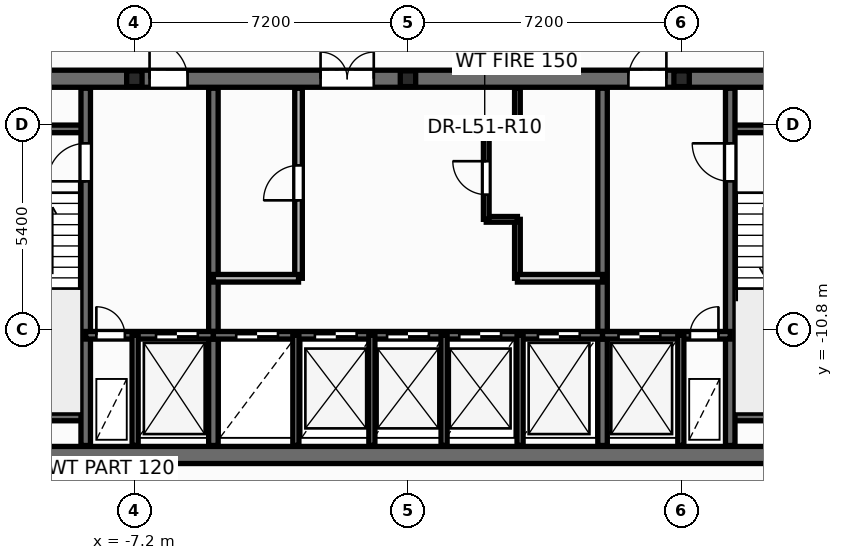
"""IFC4 building model, lengths in metres.
Left out: names, types, materials, properties, quantities, classifications, styles, units other than length and angle.
Written with IfcOpenShell. Run it as: python <this file> out.ifc"""

import sys

from ifc_helpers import new_model, si_unit, direction, frame, frame_2d, origin, origin_2d, place, context, subcontext, project, spatial, rectangle, i_section, extrude, element, fill, save


model = new_model("IFC4")
c1 = context("Model", 3, precision=1e-05, world=origin(), true_north=direction((0.0, 1.0)))
c2 = subcontext(c1, "Body", "Model", "MODEL_VIEW")
j1 = project(units=[si_unit("LENGTHUNIT", "METRE"), si_unit("PLANEANGLEUNIT", "RADIAN")], contexts=[c1])
p1 = place(None, origin())
s1 = spatial("IfcSite", under=j1, at=p1, CompositionType="ELEMENT")
p2 = place(p1, origin())
s2 = spatial("IfcBuilding", under=s1, at=p2, CompositionType="ELEMENT")
p3 = place(p2, frame((0.0, 0.0, 196.5)))
s3 = spatial("IfcBuildingStorey", under=s2, at=p3, CompositionType="ELEMENT", Elevation=196.5)
for number, where, z_axis, x_axis in (
    (1, (-7.2, -4.2, 0.0), (0.0, 0.0, 1.0), (1.0, 0.0, 0.0)),
    (2, (0.0, -4.2, 0.0), (0.0, 0.0, 1.0), (1.0, 0.0, 0.0)),
    (3, (7.2, -4.2, 0.0), (0.0, 0.0, 1.0), (1.0, 0.0, 0.0)),
):
    element("IfcColumn", number, at=place(p3, frame(where, z_axis=z_axis, x_axis=x_axis)), inside=s3, PredefinedType="PILASTER", context=c2, shape_type="SweptSolid", body=[
        extrude(i_section(OverallWidth=0.405, OverallDepth=0.414, WebThickness=0.022, FlangeThickness=0.032, at=origin_2d()), origin(), (0.0, 0.0, 1.0), 3.6),
    ])
p4 = place(p3, frame((2.88, -9.45, 0.0), z_axis=(0.0, 0.0, 1.0), x_axis=(0.0, 1.0, 0.0)))
e4 = element("IfcWall", 4, at=p4, inside=s3, PredefinedType="PARTITIONING", context=c2, shape_type="SweptSolid", body=[
    extrude(rectangle(XDim=1.55, YDim=0.15, at=frame_2d((0.775, 0.0))), origin(), (0.0, 0.0, 1.0), 3.35),
])
p5 = place(p3, frame((2.06, -7.9, 0.0), z_axis=(0.0, 0.0, 1.0), x_axis=(1.0, 0.0, 0.0)))
e5 = element("IfcWall", 5, at=p5, inside=s3, PredefinedType="PARTITIONING", context=c2, shape_type="SweptSolid", body=[
    extrude(rectangle(XDim=0.82, YDim=0.15, at=frame_2d((0.41, 0.0))), origin(), (0.0, 0.0, 1.0), 3.35),
])
p6 = place(p3, frame((2.06, -7.9, 0.0), z_axis=(0.0, 0.0, 1.0), x_axis=(0.0, 1.0, 0.0)))
e6 = element("IfcWall", 6, at=p6, inside=s3, PredefinedType="PARTITIONING", context=c2, shape_type="SweptSolid", body=[
    extrude(rectangle(XDim=2.3, YDim=0.15, at=frame_2d((1.15, 0.0))), origin(), (0.0, 0.0, 1.0), 3.35),
])
p7 = place(p6, frame((0.65, 0.0, 0.0)))
e7 = element("IfcOpeningElement", 7, at=p7, cuts=e6, PredefinedType="OPENING", context=c2, shape_type="SweptSolid", body=[
    extrude(rectangle(XDim=0.886, YDim=2.104, at=frame_2d((0.44, 1.052))), frame((0.0, 0.085, 0.0), z_axis=(0.0, -1.0, 0.0), x_axis=(1.0, 0.0, 0.0)), (0.0, 0.0, 1.0), 0.17),
])
p8 = place(p3, frame((2.06, -5.6, 0.0), z_axis=(0.0, 0.0, 1.0), x_axis=(1.0, 0.0, 0.0)))
e8 = element("IfcWall", 8, at=p8, inside=s3, PredefinedType="PARTITIONING", context=c2, shape_type="SweptSolid", body=[
    extrude(rectangle(XDim=0.82, YDim=0.15, at=frame_2d((0.41, 0.0))), origin(), (0.0, 0.0, 1.0), 3.35),
])
p9 = place(p3, frame((2.88, -5.6, 0.0), z_axis=(0.0, 0.0, 1.0), x_axis=(0.0, 1.0, 0.0)))
e9 = element("IfcWall", 9, at=p9, inside=s3, PredefinedType="PARTITIONING", context=c2, shape_type="SweptSolid", body=[
    extrude(rectangle(XDim=1.15, YDim=0.15, at=frame_2d((0.575, 0.0))), origin(), (0.0, 0.0, 1.0), 3.35),
])
p10 = place(p3, frame((-12.65, -14.1, 0.0), z_axis=(0.0, 0.0, 1.0), x_axis=(1.0, 0.0, 0.0)))
e10 = element("IfcWall", 10, at=p10, inside=s3, PredefinedType="SHEAR", context=c2, shape_type="SweptSolid", body=[
    extrude(rectangle(XDim=25.3, YDim=0.45, at=frame_2d((12.65, 0.0))), origin(), (0.0, 0.0, 1.0), 3.6),
])
p11 = place(p3, frame((-12.65, -4.2, 0.0), z_axis=(0.0, 0.0, 1.0), x_axis=(1.0, 0.0, 0.0)))
e11 = element("IfcWall", 11, at=p11, inside=s3, PredefinedType="SHEAR", context=c2, shape_type="SweptSolid", body=[
    extrude(rectangle(XDim=25.3, YDim=0.45, at=frame_2d((12.65, 0.0))), origin(), (0.0, 0.0, 1.0), 3.6),
])
p12 = place(p11, frame((1.85, 0.0, 0.0)))
e12 = element("IfcOpeningElement", 12, at=p12, cuts=e11, PredefinedType="OPENING", context=c2, shape_type="SweptSolid", body=[
    extrude(rectangle(XDim=0.756, YDim=2.054, at=frame_2d((0.375, 1.027))), frame((0.0, 0.235, 0.0), z_axis=(0.0, -1.0, 0.0), x_axis=(1.0, 0.0, 0.0)), (0.0, 0.0, 1.0), 0.47),
])
p13 = place(p11, frame((22.65, 0.0, 0.0)))
e13 = element("IfcOpeningElement", 13, at=p13, cuts=e11, PredefinedType="OPENING", context=c2, shape_type="SweptSolid", body=[
    extrude(rectangle(XDim=0.756, YDim=2.054, at=frame_2d((0.375, 1.027))), frame((0.0, 0.235, 0.0), z_axis=(0.0, -1.0, 0.0), x_axis=(1.0, 0.0, 0.0)), (0.0, 0.0, 1.0), 0.47),
])
p14 = place(p11, frame((5.85, 0.0, 0.0)))
e14 = element("IfcOpeningElement", 14, at=p14, cuts=e11, PredefinedType="OPENING", context=c2, shape_type="SweptSolid", body=[
    extrude(rectangle(XDim=1.006, YDim=2.104, at=frame_2d((0.5, 1.052))), frame((0.0, 0.235, 0.0), z_axis=(0.0, -1.0, 0.0), x_axis=(1.0, 0.0, 0.0)), (0.0, 0.0, 1.0), 0.47),
])
p15 = place(p11, frame((10.35, 0.0, 0.0)))
e15 = element("IfcOpeningElement", 15, at=p15, cuts=e11, PredefinedType="OPENING", context=c2, shape_type="SweptSolid", body=[
    extrude(rectangle(XDim=1.406, YDim=2.154, at=frame_2d((0.7, 1.077))), frame((0.0, 0.235, 0.0), z_axis=(0.0, -1.0, 0.0), x_axis=(1.0, 0.0, 0.0)), (0.0, 0.0, 1.0), 0.47),
])
p16 = place(p11, frame((18.45, 0.0, 0.0)))
e16 = element("IfcOpeningElement", 16, at=p16, cuts=e11, PredefinedType="OPENING", context=c2, shape_type="SweptSolid", body=[
    extrude(rectangle(XDim=1.006, YDim=2.104, at=frame_2d((0.5, 1.052))), frame((0.0, 0.235, 0.0), z_axis=(0.0, -1.0, 0.0), x_axis=(1.0, 0.0, 0.0)), (0.0, 0.0, 1.0), 0.47),
])
for number, where, z_axis, x_axis in (
    (17, (-12.35, -5.52, 0.0), (0.0, 0.0, 1.0), (1.0, 0.0, 0.0)),
    (18, (-12.35, -13.1, 0.0), (0.0, 0.0, 1.0), (1.0, 0.0, 0.0)),
    (19, (8.48, -5.52, 0.0), (0.0, 0.0, 1.0), (1.0, 0.0, 0.0)),
    (20, (8.48, -13.1, 0.0), (0.0, 0.0, 1.0), (1.0, 0.0, 0.0)),
):
    element("IfcWall", number, at=place(p3, frame(where, z_axis=z_axis, x_axis=x_axis)), inside=s3, PredefinedType="SOLIDWALL", context=c2, shape_type="SweptSolid", body=[
        extrude(rectangle(XDim=3.87, YDim=0.2, at=frame_2d((1.935, 0.0))), origin(), (0.0, 0.0, 1.0), 3.6),
    ])
p17 = place(p3, frame((-8.48, -13.85, 0.0), z_axis=(0.0, 0.0, 1.0), x_axis=(0.0, 1.0, 0.0)))
e21 = element("IfcWall", 21, at=p17, inside=s3, PredefinedType="SHEAR", context=c2, shape_type="SweptSolid", body=[
    extrude(rectangle(XDim=9.4, YDim=0.25, at=frame_2d((4.7, 0.0))), origin(), (0.0, 0.0, 1.0), 3.6),
])
p18 = place(p17, frame((6.95, 0.0, 0.0)))
e22 = element("IfcOpeningElement", 22, at=p18, cuts=e21, PredefinedType="OPENING", context=c2, shape_type="SweptSolid", body=[
    extrude(rectangle(XDim=1.006, YDim=2.104, at=frame_2d((0.5, 1.052))), frame((0.0, 0.135, 0.0), z_axis=(0.0, -1.0, 0.0), x_axis=(1.0, 0.0, 0.0)), (0.0, 0.0, 1.0), 0.27),
])
p19 = place(p3, frame((8.48, -13.85, 0.0), z_axis=(0.0, 0.0, 1.0), x_axis=(0.0, 1.0, 0.0)))
e23 = element("IfcWall", 23, at=p19, inside=s3, PredefinedType="SHEAR", context=c2, shape_type="SweptSolid", body=[
    extrude(rectangle(XDim=9.4, YDim=0.25, at=frame_2d((4.7, 0.0))), origin(), (0.0, 0.0, 1.0), 3.6),
])
p20 = place(p19, frame((6.95, 0.0, 0.0)))
e24 = element("IfcOpeningElement", 24, at=p20, cuts=e23, PredefinedType="OPENING", context=c2, shape_type="SweptSolid", body=[
    extrude(rectangle(XDim=1.006, YDim=2.104, at=frame_2d((0.5, 1.052))), frame((0.0, 0.135, 0.0), z_axis=(0.0, -1.0, 0.0), x_axis=(1.0, 0.0, 0.0)), (0.0, 0.0, 1.0), 0.27),
])
for number, where, z_axis, x_axis in (
    (25, (-5.12, -13.85, 0.0), (0.0, 0.0, 1.0), (0.0, 1.0, 0.0)),
    (26, (5.12, -13.85, 0.0), (0.0, 0.0, 1.0), (0.0, 1.0, 0.0)),
):
    element("IfcWall", number, at=place(p3, frame(where, z_axis=z_axis, x_axis=x_axis)), inside=s3, PredefinedType="SHEAR", context=c2, shape_type="SweptSolid", body=[
        extrude(rectangle(XDim=9.4, YDim=0.25, at=frame_2d((4.7, 0.0))), origin(), (0.0, 0.0, 1.0), 3.6),
    ])
p21 = place(p3, frame((-8.48, -10.95, 0.0), z_axis=(0.0, 0.0, 1.0), x_axis=(1.0, 0.0, 0.0)))
e27 = element("IfcWall", 27, at=p21, inside=s3, PredefinedType="SOLIDWALL", context=c2, shape_type="SweptSolid", body=[
    extrude(rectangle(XDim=3.36, YDim=0.2, at=frame_2d((1.68, 0.0))), origin(), (0.0, 0.0, 1.0), 3.6),
])
p22 = place(p21, frame((0.28, 0.0, 0.0)))
e28 = element("IfcOpeningElement", 28, at=p22, cuts=e27, PredefinedType="OPENING", context=c2, shape_type="SweptSolid", body=[
    extrude(rectangle(XDim=0.756, YDim=2.054, at=frame_2d((0.375, 1.027))), frame((0.0, 0.11, 0.0), z_axis=(0.0, -1.0, 0.0), x_axis=(1.0, 0.0, 0.0)), (0.0, 0.0, 1.0), 0.22),
])
p23 = place(p21, frame((1.85, 0.0, 0.0)))
e29 = element("IfcOpeningElement", 29, at=p23, cuts=e27, PredefinedType="OPENING", context=c2, shape_type="SweptSolid", body=[
    extrude(rectangle(XDim=1.106, YDim=2.104, at=frame_2d((0.55, 1.052))), frame((0.0, 0.11, 0.0), z_axis=(0.0, -1.0, 0.0), x_axis=(1.0, 0.0, 0.0)), (0.0, 0.0, 1.0), 0.22),
])
p24 = place(p3, frame((-5.12, -10.95, 0.0), z_axis=(0.0, 0.0, 1.0), x_axis=(1.0, 0.0, 0.0)))
e30 = element("IfcWall", 30, at=p24, inside=s3, PredefinedType="SOLIDWALL", context=c2, shape_type="SweptSolid", body=[
    extrude(rectangle(XDim=10.24, YDim=0.2, at=frame_2d((5.12, 0.0))), origin(), (0.0, 0.0, 1.0), 3.6),
])
p25 = place(p24, frame((0.6, 0.0, 0.0)))
e31 = element("IfcOpeningElement", 31, at=p25, cuts=e30, PredefinedType="OPENING", context=c2, shape_type="SweptSolid", body=[
    extrude(rectangle(XDim=1.106, YDim=2.104, at=frame_2d((0.55, 1.052))), frame((0.0, 0.11, 0.0), z_axis=(0.0, -1.0, 0.0), x_axis=(1.0, 0.0, 0.0)), (0.0, 0.0, 1.0), 0.22),
])
p26 = place(p24, frame((2.67, 0.0, 0.0)))
e32 = element("IfcOpeningElement", 32, at=p26, cuts=e30, PredefinedType="OPENING", context=c2, shape_type="SweptSolid", body=[
    extrude(rectangle(XDim=1.106, YDim=2.104, at=frame_2d((0.55, 1.052))), frame((0.0, 0.11, 0.0), z_axis=(0.0, -1.0, 0.0), x_axis=(1.0, 0.0, 0.0)), (0.0, 0.0, 1.0), 0.22),
])
p27 = place(p24, frame((4.57, 0.0, 0.0)))
e33 = element("IfcOpeningElement", 33, at=p27, cuts=e30, PredefinedType="OPENING", context=c2, shape_type="SweptSolid", body=[
    extrude(rectangle(XDim=1.106, YDim=2.104, at=frame_2d((0.55, 1.052))), frame((0.0, 0.11, 0.0), z_axis=(0.0, -1.0, 0.0), x_axis=(1.0, 0.0, 0.0)), (0.0, 0.0, 1.0), 0.22),
])
p28 = place(p24, frame((6.47, 0.0, 0.0)))
e34 = element("IfcOpeningElement", 34, at=p28, cuts=e30, PredefinedType="OPENING", context=c2, shape_type="SweptSolid", body=[
    extrude(rectangle(XDim=1.106, YDim=2.104, at=frame_2d((0.55, 1.052))), frame((0.0, 0.11, 0.0), z_axis=(0.0, -1.0, 0.0), x_axis=(1.0, 0.0, 0.0)), (0.0, 0.0, 1.0), 0.22),
])
p29 = place(p24, frame((8.54, 0.0, 0.0)))
e35 = element("IfcOpeningElement", 35, at=p29, cuts=e30, PredefinedType="OPENING", context=c2, shape_type="SweptSolid", body=[
    extrude(rectangle(XDim=1.106, YDim=2.104, at=frame_2d((0.55, 1.052))), frame((0.0, 0.11, 0.0), z_axis=(0.0, -1.0, 0.0), x_axis=(1.0, 0.0, 0.0)), (0.0, 0.0, 1.0), 0.22),
])
p30 = place(p3, frame((5.12, -10.95, 0.0), z_axis=(0.0, 0.0, 1.0), x_axis=(1.0, 0.0, 0.0)))
e36 = element("IfcWall", 36, at=p30, inside=s3, PredefinedType="SOLIDWALL", context=c2, shape_type="SweptSolid", body=[
    extrude(rectangle(XDim=3.36, YDim=0.2, at=frame_2d((1.68, 0.0))), origin(), (0.0, 0.0, 1.0), 3.6),
])
p31 = place(p30, frame((0.42, 0.0, 0.0)))
e37 = element("IfcOpeningElement", 37, at=p31, cuts=e36, PredefinedType="OPENING", context=c2, shape_type="SweptSolid", body=[
    extrude(rectangle(XDim=1.106, YDim=2.104, at=frame_2d((0.55, 1.052))), frame((0.0, 0.11, 0.0), z_axis=(0.0, -1.0, 0.0), x_axis=(1.0, 0.0, 0.0)), (0.0, 0.0, 1.0), 0.22),
])
p32 = place(p30, frame((2.3, 0.0, 0.0)))
e38 = element("IfcOpeningElement", 38, at=p32, cuts=e36, PredefinedType="OPENING", context=c2, shape_type="SweptSolid", body=[
    extrude(rectangle(XDim=0.756, YDim=2.054, at=frame_2d((0.375, 1.027))), frame((0.0, 0.11, 0.0), z_axis=(0.0, -1.0, 0.0), x_axis=(1.0, 0.0, 0.0)), (0.0, 0.0, 1.0), 0.22),
])
for number, where, z_axis, x_axis in (
    (39, (-7.18, -13.85, 0.0), (0.0, 0.0, 1.0), (0.0, 1.0, 0.0)),
    (40, (7.18, -13.85, 0.0), (0.0, 0.0, 1.0), (0.0, 1.0, 0.0)),
    (41, (-2.95, -13.85, 0.0), (0.0, 0.0, 1.0), (0.0, 1.0, 0.0)),
    (42, (2.95, -13.85, 0.0), (0.0, 0.0, 1.0), (0.0, 1.0, 0.0)),
):
    element("IfcWall", number, at=place(p3, frame(where, z_axis=z_axis, x_axis=x_axis)), inside=s3, PredefinedType="PARTITIONING", context=c2, shape_type="SweptSolid", body=[
        extrude(rectangle(XDim=2.9, YDim=0.16, at=frame_2d((1.45, 0.0))), origin(), (0.0, 0.0, 1.0), 2.475),
    ])
p33 = place(p3, frame((-2.88, -9.45, 0.0), z_axis=(0.0, 0.0, 1.0), x_axis=(0.0, 1.0, 0.0)))
e43 = element("IfcWall", 43, at=p33, inside=s3, PredefinedType="SOLIDWALL", context=c2, shape_type="SweptSolid", body=[
    extrude(rectangle(XDim=5.0, YDim=0.2, at=frame_2d((2.5, 0.0))), origin(), (0.0, 0.0, 1.0), 3.35),
])
p34 = place(p33, frame((2.05, 0.0, 0.0)))
e44 = element("IfcOpeningElement", 44, at=p34, cuts=e43, PredefinedType="OPENING", context=c2, shape_type="SweptSolid", body=[
    extrude(rectangle(XDim=0.926, YDim=2.104, at=frame_2d((0.46, 1.052))), frame((0.0, 0.11, 0.0), z_axis=(0.0, -1.0, 0.0), x_axis=(1.0, 0.0, 0.0)), (0.0, 0.0, 1.0), 0.22),
])
for number, where, z_axis, x_axis in (
    (45, (-5.12, -9.45, 0.0), (0.0, 0.0, 1.0), (1.0, 0.0, 0.0)),
    (46, (2.88, -9.45, 0.0), (0.0, 0.0, 1.0), (1.0, 0.0, 0.0)),
):
    element("IfcWall", number, at=place(p3, frame(where, z_axis=z_axis, x_axis=x_axis)), inside=s3, PredefinedType="SOLIDWALL", context=c2, shape_type="SweptSolid", body=[
        extrude(rectangle(XDim=2.24, YDim=0.2, at=frame_2d((1.12, 0.0))), origin(), (0.0, 0.0, 1.0), 3.35),
    ])
for number, where, z_axis, x_axis in (
    (47, (-0.95, -13.85, 0.0), (0.0, 0.0, 1.0), (0.0, 1.0, 0.0)),
    (48, (0.95, -13.85, 0.0), (0.0, 0.0, 1.0), (0.0, 1.0, 0.0)),
):
    element("IfcWall", number, at=place(p3, frame(where, z_axis=z_axis, x_axis=x_axis)), inside=s3, PredefinedType="PARTITIONING", context=c2, shape_type="SweptSolid", body=[
        extrude(rectangle(XDim=2.9, YDim=0.16, at=frame_2d((1.45, 0.0))), origin(), (0.0, 0.0, 1.0), 2.475),
    ])
p35 = place(p34, origin())
e49 = element("IfcDoor", 49, at=p35, inside=s3, OperationType="SINGLE_SWING_LEFT", PredefinedType="DOOR", context=c2, shape_type="SweptSolid", body=[
    extrude(rectangle(XDim=0.92, YDim=2.1, at=frame_2d((0.46, 1.05))), frame((0.0, 0.025, 0.0), z_axis=(0.0, -1.0, 0.0), x_axis=(1.0, 0.0, 0.0)), (0.0, 0.0, 1.0), 0.05),
])
fill(e44, e49)
p36 = place(p7, origin())
e50 = element("IfcDoor", 50, at=p36, inside=s3, OperationType="SINGLE_SWING_RIGHT", PredefinedType="DOOR", context=c2, shape_type="SweptSolid", body=[
    extrude(rectangle(XDim=0.88, YDim=2.1, at=frame_2d((0.44, 1.05))), frame((0.0, 0.025, 0.0), z_axis=(0.0, -1.0, 0.0), x_axis=(1.0, 0.0, 0.0)), (0.0, 0.0, 1.0), 0.05),
])
fill(e7, e50)
p37 = place(p18, origin())
e51 = element("IfcDoor", 51, at=p37, inside=s3, OperationType="SINGLE_SWING_LEFT", PredefinedType="DOOR", context=c2, shape_type="SweptSolid", body=[
    extrude(rectangle(XDim=1.0, YDim=2.1, at=frame_2d((0.5, 1.05))), frame((0.0, 0.025, 0.0), z_axis=(0.0, -1.0, 0.0), x_axis=(1.0, 0.0, 0.0)), (0.0, 0.0, 1.0), 0.05),
])
fill(e22, e51)
p38 = place(p20, origin())
e52 = element("IfcDoor", 52, at=p38, inside=s3, OperationType="SINGLE_SWING_RIGHT", PredefinedType="DOOR", context=c2, shape_type="SweptSolid", body=[
    extrude(rectangle(XDim=1.0, YDim=2.1, at=frame_2d((0.5, 1.05))), frame((0.0, 0.025, 0.0), z_axis=(0.0, -1.0, 0.0), x_axis=(1.0, 0.0, 0.0)), (0.0, 0.0, 1.0), 0.05),
])
fill(e24, e52)
p39 = place(p22, origin())
e53 = element("IfcDoor", 53, at=p39, inside=s3, OperationType="SINGLE_SWING_LEFT", PredefinedType="DOOR", context=c2, shape_type="SweptSolid", body=[
    extrude(rectangle(XDim=0.75, YDim=2.05, at=frame_2d((0.375, 1.025))), frame((0.0, 0.025, 0.0), z_axis=(0.0, -1.0, 0.0), x_axis=(1.0, 0.0, 0.0)), (0.0, 0.0, 1.0), 0.05),
])
fill(e28, e53)
p40 = place(p23, origin())
e54 = element("IfcDoor", 54, at=p40, inside=s3, OperationType="DOUBLE_DOOR_SLIDING", PredefinedType="DOOR", context=c2, shape_type="SweptSolid", body=[
    extrude(rectangle(XDim=1.1, YDim=2.1, at=frame_2d((0.55, 1.05))), frame((0.0, 0.025, 0.0), z_axis=(0.0, -1.0, 0.0), x_axis=(1.0, 0.0, 0.0)), (0.0, 0.0, 1.0), 0.05),
])
fill(e29, e54)
p41 = place(p31, origin())
e55 = element("IfcDoor", 55, at=p41, inside=s3, OperationType="DOUBLE_DOOR_SLIDING", PredefinedType="DOOR", context=c2, shape_type="SweptSolid", body=[
    extrude(rectangle(XDim=1.1, YDim=2.1, at=frame_2d((0.55, 1.05))), frame((0.0, 0.025, 0.0), z_axis=(0.0, -1.0, 0.0), x_axis=(1.0, 0.0, 0.0)), (0.0, 0.0, 1.0), 0.05),
])
fill(e37, e55)
p42 = place(p32, origin())
e56 = element("IfcDoor", 56, at=p42, inside=s3, OperationType="SINGLE_SWING_RIGHT", PredefinedType="DOOR", context=c2, shape_type="SweptSolid", body=[
    extrude(rectangle(XDim=0.75, YDim=2.05, at=frame_2d((0.375, 1.025))), frame((0.0, 0.025, 0.0), z_axis=(0.0, -1.0, 0.0), x_axis=(1.0, 0.0, 0.0)), (0.0, 0.0, 1.0), 0.05),
])
fill(e38, e56)
p43 = place(p25, origin())
e57 = element("IfcDoor", 57, at=p43, inside=s3, OperationType="DOUBLE_DOOR_SLIDING", PredefinedType="DOOR", context=c2, shape_type="SweptSolid", body=[
    extrude(rectangle(XDim=1.1, YDim=2.1, at=frame_2d((0.55, 1.05))), frame((0.0, 0.025, 0.0), z_axis=(0.0, -1.0, 0.0), x_axis=(1.0, 0.0, 0.0)), (0.0, 0.0, 1.0), 0.05),
])
fill(e31, e57)
p44 = place(p26, origin())
e58 = element("IfcDoor", 58, at=p44, inside=s3, OperationType="DOUBLE_DOOR_SLIDING", PredefinedType="DOOR", context=c2, shape_type="SweptSolid", body=[
    extrude(rectangle(XDim=1.1, YDim=2.1, at=frame_2d((0.55, 1.05))), frame((0.0, 0.025, 0.0), z_axis=(0.0, -1.0, 0.0), x_axis=(1.0, 0.0, 0.0)), (0.0, 0.0, 1.0), 0.05),
])
fill(e32, e58)
p45 = place(p27, origin())
e59 = element("IfcDoor", 59, at=p45, inside=s3, OperationType="DOUBLE_DOOR_SLIDING", PredefinedType="DOOR", context=c2, shape_type="SweptSolid", body=[
    extrude(rectangle(XDim=1.1, YDim=2.1, at=frame_2d((0.55, 1.05))), frame((0.0, 0.025, 0.0), z_axis=(0.0, -1.0, 0.0), x_axis=(1.0, 0.0, 0.0)), (0.0, 0.0, 1.0), 0.05),
])
fill(e33, e59)
p46 = place(p28, origin())
e60 = element("IfcDoor", 60, at=p46, inside=s3, OperationType="DOUBLE_DOOR_SLIDING", PredefinedType="DOOR", context=c2, shape_type="SweptSolid", body=[
    extrude(rectangle(XDim=1.1, YDim=2.1, at=frame_2d((0.55, 1.05))), frame((0.0, 0.025, 0.0), z_axis=(0.0, -1.0, 0.0), x_axis=(1.0, 0.0, 0.0)), (0.0, 0.0, 1.0), 0.05),
])
fill(e34, e60)
p47 = place(p29, origin())
e61 = element("IfcDoor", 61, at=p47, inside=s3, OperationType="DOUBLE_DOOR_SLIDING", PredefinedType="DOOR", context=c2, shape_type="SweptSolid", body=[
    extrude(rectangle(XDim=1.1, YDim=2.1, at=frame_2d((0.55, 1.05))), frame((0.0, 0.025, 0.0), z_axis=(0.0, -1.0, 0.0), x_axis=(1.0, 0.0, 0.0)), (0.0, 0.0, 1.0), 0.05),
])
fill(e35, e61)
p48 = place(p14, origin())
e62 = element("IfcDoor", 62, at=p48, inside=s3, OperationType="SINGLE_SWING_LEFT", PredefinedType="DOOR", context=c2, shape_type="SweptSolid", body=[
    extrude(rectangle(XDim=1.0, YDim=2.1, at=frame_2d((0.5, 1.05))), frame((0.0, 0.025, 0.0), z_axis=(0.0, -1.0, 0.0), x_axis=(1.0, 0.0, 0.0)), (0.0, 0.0, 1.0), 0.05),
])
fill(e14, e62)
p49 = place(p15, origin())
e63 = element("IfcDoor", 63, at=p49, inside=s3, OperationType="DOUBLE_DOOR_SINGLE_SWING", PredefinedType="DOOR", context=c2, shape_type="SweptSolid", body=[
    extrude(rectangle(XDim=1.4, YDim=2.15, at=frame_2d((0.7, 1.075))), frame((0.0, 0.025, 0.0), z_axis=(0.0, -1.0, 0.0), x_axis=(1.0, 0.0, 0.0)), (0.0, 0.0, 1.0), 0.05),
])
fill(e15, e63)
p50 = place(p16, origin())
e64 = element("IfcDoor", 64, at=p50, inside=s3, OperationType="SINGLE_SWING_RIGHT", PredefinedType="DOOR", context=c2, shape_type="SweptSolid", body=[
    extrude(rectangle(XDim=1.0, YDim=2.1, at=frame_2d((0.5, 1.05))), frame((0.0, 0.025, 0.0), z_axis=(0.0, -1.0, 0.0), x_axis=(1.0, 0.0, 0.0)), (0.0, 0.0, 1.0), 0.05),
])
fill(e16, e64)
save(model, sys.argv[1])
